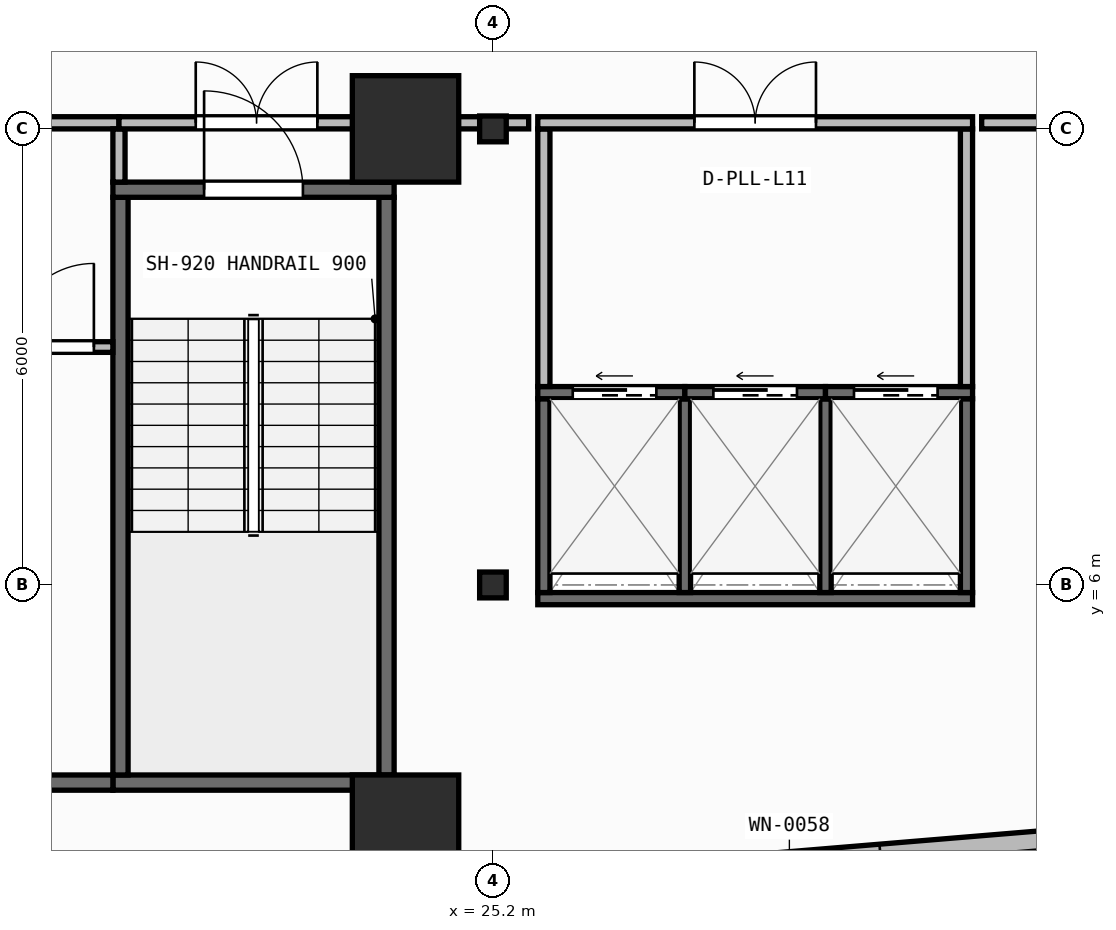
"""IFC4 building model, lengths in metres.
Left out: names, types, materials, properties, quantities, classifications, styles, units other than length and angle.
Written with IfcOpenShell. Run it as: python <this file> out.ifc"""

import sys

from ifc_helpers import new_model, si_unit, direction, frame, frame_2d, origin, origin_2d, place, context, subcontext, project, spatial, rectangle, i_section, extrude, element, fill, save


model = new_model("IFC4")
c1 = context("Model", 3, precision=1e-05, world=origin(), true_north=direction((0.0, 1.0)))
c2 = subcontext(c1, "Body", "Model", "MODEL_VIEW")
j1 = project(units=[si_unit("LENGTHUNIT", "METRE"), si_unit("PLANEANGLEUNIT", "RADIAN")], contexts=[c1])
p1 = place(None, origin())
s1 = spatial("IfcSite", under=j1, at=p1, CompositionType="ELEMENT")
p2 = place(p1, origin())
s2 = spatial("IfcBuilding", under=s1, at=p2, CompositionType="ELEMENT")
p3 = place(p2, frame((0.0, 0.0, 46.2)))
s3 = spatial("IfcBuildingStorey", under=s2, at=p3, CompositionType="ELEMENT", Elevation=46.2)
p4 = place(p3, frame((24.05, 2.8, 0.0), z_axis=(0.0, 0.0, 1.0), x_axis=(1.0, 0.0, 0.0)))
e1 = element("IfcColumn", 1, at=p4, inside=s3, PredefinedType="COLUMN", context=c2, shape_type="SweptSolid", body=[
    extrude(rectangle(XDim=1.4, YDim=1.4, at=origin_2d()), origin(), (0.0, 0.0, 1.0), 3.95),
])
p5 = place(p3, frame((25.2, 6.0, 0.0), z_axis=(0.0, 0.0, 1.0), x_axis=(1.0, 0.0, 0.0)))
e2 = element("IfcColumn", 2, at=p5, inside=s3, PredefinedType="COLUMN", context=c2, shape_type="SweptSolid", body=[
    extrude(i_section(OverallWidth=0.35, OverallDepth=0.34, WebThickness=0.016, FlangeThickness=0.028, at=origin_2d()), origin(), (0.0, 0.0, 1.0), 3.95),
])
p6 = place(p3, frame((24.05, 12.0, 0.0), z_axis=(0.0, 0.0, 1.0), x_axis=(1.0, 0.0, 0.0)))
e3 = element("IfcColumn", 3, at=p6, inside=s3, PredefinedType="COLUMN", context=c2, shape_type="SweptSolid", body=[
    extrude(rectangle(XDim=1.4, YDim=1.4, at=origin_2d()), origin(), (0.0, 0.0, 1.0), 3.95),
])
p7 = place(p3, frame((25.2, 12.0, 0.0), z_axis=(0.0, 0.0, 1.0), x_axis=(1.0, 0.0, 0.0)))
e4 = element("IfcColumn", 4, at=p7, inside=s3, PredefinedType="COLUMN", context=c2, shape_type="SweptSolid", body=[
    extrude(i_section(OverallWidth=0.35, OverallDepth=0.34, WebThickness=0.016, FlangeThickness=0.028, at=origin_2d()), origin(), (0.0, 0.0, 1.0), 3.95),
])
p8 = place(p3, frame((2.76, 0.174, 0.0), z_axis=(0.0, 0.0, 1.0), x_axis=(0.996571478456, 0.082736257641, 0.0)))
e5 = element("IfcWall", 5, at=p8, inside=s3, PredefinedType="STANDARD", context=c2, shape_type="SweptSolid", body=[
    extrude(rectangle(XDim=52.861, YDim=0.26, at=frame_2d((26.431, 0.0))), origin(), (0.0, 0.0, 1.0), 3.71),
])
p9 = place(p8, frame((25.231, 0.0, 0.9)))
e6 = element("IfcOpeningElement", 6, at=p9, cuts=e5, PredefinedType="OPENING", context=c2, shape_type="SweptSolid", body=[
    extrude(rectangle(XDim=2.4, YDim=1.65, at=frame_2d((1.2, 0.825))), frame((0.0, 0.14, 0.0), z_axis=(0.0, -1.0, 0.0), x_axis=(1.0, 0.0, 0.0)), (0.0, 0.0, 1.0), 0.28),
])
p10 = place(p3, frame((20.2, 3.4, 0.0), z_axis=(0.0, 0.0, 1.0), x_axis=(1.0, 0.0, 0.0)))
e7 = element("IfcWall", 7, at=p10, inside=s3, PredefinedType="SHEAR", context=c2, shape_type="SweptSolid", body=[
    extrude(rectangle(XDim=3.7, YDim=0.2, at=frame_2d((1.85, 0.0))), origin(), (0.0, 0.0, 1.0), 3.71),
])
for number, where, z_axis, x_axis in (
    (8, (20.3, 3.5, 0.0), (0.0, 0.0, 1.0), (0.0, 1.0, 0.0)),
    (9, (23.8, 3.5, 0.0), (0.0, 0.0, 1.0), (0.0, 1.0, 0.0)),
):
    element("IfcWall", number, at=place(p3, frame(where, z_axis=z_axis, x_axis=x_axis)), inside=s3, PredefinedType="SHEAR", context=c2, shape_type="SweptSolid", body=[
        extrude(rectangle(XDim=7.6, YDim=0.2, at=frame_2d((3.8, 0.0))), origin(), (0.0, 0.0, 1.0), 3.71),
    ])
p11 = place(p3, frame((20.2, 11.2, 0.0), z_axis=(0.0, 0.0, 1.0), x_axis=(1.0, 0.0, 0.0)))
e10 = element("IfcWall", 10, at=p11, inside=s3, PredefinedType="SHEAR", context=c2, shape_type="SweptSolid", body=[
    extrude(rectangle(XDim=3.7, YDim=0.2, at=frame_2d((1.85, 0.0))), origin(), (0.0, 0.0, 1.0), 3.71),
])
p12 = place(p11, frame((1.2, 0.0, 0.0)))
e11 = element("IfcOpeningElement", 11, at=p12, cuts=e10, PredefinedType="OPENING", context=c2, shape_type="SweptSolid", body=[
    extrude(rectangle(XDim=1.3, YDim=2.15, at=frame_2d((0.65, 1.075))), frame((0.0, 0.11, 0.0), z_axis=(0.0, -1.0, 0.0), x_axis=(1.0, 0.0, 0.0)), (0.0, 0.0, 1.0), 0.22),
])
p13 = place(p3, frame((6.5, 3.4, 0.0), z_axis=(0.0, 0.0, 1.0), x_axis=(1.0, 0.0, 0.0)))
e12 = element("IfcWall", 12, at=p13, inside=s3, PredefinedType="SHEAR", context=c2, shape_type="SweptSolid", body=[
    extrude(rectangle(XDim=13.7, YDim=0.2, at=frame_2d((6.85, 0.0))), origin(), (0.0, 0.0, 1.0), 3.71),
])
p14 = place(p3, frame((25.79, 5.82, 0.0), z_axis=(0.0, 0.0, 1.0), x_axis=(1.0, 0.0, 0.0)))
e13 = element("IfcWall", 13, at=p14, inside=s3, PredefinedType="SHEAR", context=c2, shape_type="SweptSolid", body=[
    extrude(rectangle(XDim=5.72, YDim=0.16, at=frame_2d((2.86, 0.0))), origin(), (0.0, 0.0, 1.0), 3.71),
])
for number, where, z_axis, x_axis in (
    (14, (25.87, 5.9, 0.0), (0.0, 0.0, 1.0), (0.0, 1.0, 0.0)),
    (15, (31.43, 5.9, 0.0), (0.0, 0.0, 1.0), (0.0, 1.0, 0.0)),
):
    element("IfcWall", number, at=place(p3, frame(where, z_axis=z_axis, x_axis=x_axis)), inside=s3, PredefinedType="SHEAR", context=c2, shape_type="SweptSolid", body=[
        extrude(rectangle(XDim=2.55, YDim=0.16, at=frame_2d((1.275, 0.0))), origin(), (0.0, 0.0, 1.0), 3.71),
    ])
for number, where, z_axis, x_axis in (
    (16, (27.725, 5.9, 0.0), (0.0, 0.0, 1.0), (0.0, 1.0, 0.0)),
    (17, (29.575, 5.9, 0.0), (0.0, 0.0, 1.0), (0.0, 1.0, 0.0)),
):
    element("IfcWall", number, at=place(p3, frame(where, z_axis=z_axis, x_axis=x_axis)), inside=s3, PredefinedType="SHEAR", context=c2, shape_type="SweptSolid", body=[
        extrude(rectangle(XDim=2.55, YDim=0.15, at=frame_2d((1.275, 0.0))), origin(), (0.0, 0.0, 1.0), 3.71),
    ])
p15 = place(p3, frame((25.79, 8.53, 0.0), z_axis=(0.0, 0.0, 1.0), x_axis=(1.0, 0.0, 0.0)))
e18 = element("IfcWall", 18, at=p15, inside=s3, PredefinedType="SHEAR", context=c2, shape_type="SweptSolid", body=[
    extrude(rectangle(XDim=1.935, YDim=0.16, at=frame_2d((0.968, 0.0))), origin(), (0.0, 0.0, 1.0), 3.71),
])
p16 = place(p15, frame((0.46, 0.0, 0.0)))
e19 = element("IfcOpeningElement", 19, at=p16, cuts=e18, PredefinedType="OPENING", context=c2, shape_type="SweptSolid", body=[
    extrude(rectangle(XDim=1.1, YDim=2.15, at=frame_2d((0.55, 1.075))), frame((0.0, 0.09, 0.0), z_axis=(0.0, -1.0, 0.0), x_axis=(1.0, 0.0, 0.0)), (0.0, 0.0, 1.0), 0.18),
])
p17 = place(p3, frame((27.725, 8.53, 0.0), z_axis=(0.0, 0.0, 1.0), x_axis=(1.0, 0.0, 0.0)))
e20 = element("IfcWall", 20, at=p17, inside=s3, PredefinedType="SHEAR", context=c2, shape_type="SweptSolid", body=[
    extrude(rectangle(XDim=1.85, YDim=0.16, at=frame_2d((0.925, 0.0))), origin(), (0.0, 0.0, 1.0), 3.71),
])
p18 = place(p17, frame((0.375, 0.0, 0.0)))
e21 = element("IfcOpeningElement", 21, at=p18, cuts=e20, PredefinedType="OPENING", context=c2, shape_type="SweptSolid", body=[
    extrude(rectangle(XDim=1.1, YDim=2.15, at=frame_2d((0.55, 1.075))), frame((0.0, 0.09, 0.0), z_axis=(0.0, -1.0, 0.0), x_axis=(1.0, 0.0, 0.0)), (0.0, 0.0, 1.0), 0.18),
])
p19 = place(p3, frame((29.575, 8.53, 0.0), z_axis=(0.0, 0.0, 1.0), x_axis=(1.0, 0.0, 0.0)))
e22 = element("IfcWall", 22, at=p19, inside=s3, PredefinedType="SHEAR", context=c2, shape_type="SweptSolid", body=[
    extrude(rectangle(XDim=1.935, YDim=0.16, at=frame_2d((0.968, 0.0))), origin(), (0.0, 0.0, 1.0), 3.71),
])
p20 = place(p19, frame((0.375, 0.0, 0.0)))
e23 = element("IfcOpeningElement", 23, at=p20, cuts=e22, PredefinedType="OPENING", context=c2, shape_type="SweptSolid", body=[
    extrude(rectangle(XDim=1.1, YDim=2.15, at=frame_2d((0.55, 1.075))), frame((0.0, 0.09, 0.0), z_axis=(0.0, -1.0, 0.0), x_axis=(1.0, 0.0, 0.0)), (0.0, 0.0, 1.0), 0.18),
])
p21 = place(p3, frame((18.61, 9.13, 0.0), z_axis=(0.0, 0.0, 1.0), x_axis=(1.0, 0.0, 0.0)))
e24 = element("IfcWall", 24, at=p21, inside=s3, PredefinedType="PARTITIONING", context=c2, shape_type="SweptSolid", body=[
    extrude(rectangle(XDim=1.59, YDim=0.14, at=frame_2d((0.795, 0.0))), origin(), (0.0, 0.0, 1.0), 3.71),
])
p22 = place(p21, frame((0.24, 0.0, 0.0)))
e25 = element("IfcOpeningElement", 25, at=p22, cuts=e24, PredefinedType="OPENING", context=c2, shape_type="SweptSolid", body=[
    extrude(rectangle(XDim=1.1, YDim=2.1, at=frame_2d((0.55, 1.05))), frame((0.0, 0.08, 0.0), z_axis=(0.0, -1.0, 0.0), x_axis=(1.0, 0.0, 0.0)), (0.0, 0.0, 1.0), 0.16),
])
p23 = place(p3, frame((12.58, 12.08, 0.0), z_axis=(0.0, 0.0, 1.0), x_axis=(1.0, 0.0, 0.0)))
e26 = element("IfcWall", 26, at=p23, inside=s3, PredefinedType="PARTITIONING", context=c2, shape_type="SweptSolid", body=[
    extrude(rectangle(XDim=7.7, YDim=0.16, at=frame_2d((3.85, 0.0))), origin(), (0.0, 0.0, 1.0), 3.073),
])
p24 = place(p23, frame((3.05, 0.0, 0.0)))
e27 = element("IfcOpeningElement", 27, at=p24, cuts=e26, PredefinedType="OPENING", context=c2, shape_type="SweptSolid", body=[
    extrude(rectangle(XDim=1.6, YDim=2.05, at=frame_2d((0.8, 1.025))), frame((0.0, 0.09, 0.0), z_axis=(0.0, -1.0, 0.0), x_axis=(1.0, 0.0, 0.0)), (0.0, 0.0, 1.0), 0.18),
])
p25 = place(p3, frame((20.28, 11.3, 0.0), z_axis=(0.0, 0.0, 1.0), x_axis=(0.0, 1.0, 0.0)))
e28 = element("IfcWall", 28, at=p25, inside=s3, PredefinedType="PARTITIONING", context=c2, shape_type="SweptSolid", body=[
    extrude(rectangle(XDim=0.7, YDim=0.16, at=frame_2d((0.35, 0.0))), origin(), (0.0, 0.0, 1.0), 3.71),
])
p26 = place(p3, frame((20.28, 12.08, 0.0), z_axis=(0.0, 0.0, 1.0), x_axis=(1.0, 0.0, 0.0)))
e29 = element("IfcWall", 29, at=p26, inside=s3, PredefinedType="PARTITIONING", context=c2, shape_type="SweptSolid", body=[
    extrude(rectangle(XDim=3.62, YDim=0.16, at=frame_2d((1.81, 0.0))), origin(), (0.0, 0.0, 1.0), 3.073),
])
p27 = place(p26, frame((1.01, 0.0, 0.0)))
e30 = element("IfcOpeningElement", 30, at=p27, cuts=e29, PredefinedType="OPENING", context=c2, shape_type="SweptSolid", body=[
    extrude(rectangle(XDim=1.6, YDim=2.05, at=frame_2d((0.8, 1.025))), frame((0.0, 0.09, 0.0), z_axis=(0.0, -1.0, 0.0), x_axis=(1.0, 0.0, 0.0)), (0.0, 0.0, 1.0), 0.18),
])
p28 = place(p3, frame((23.82, 11.3, 0.0), z_axis=(0.0, 0.0, 1.0), x_axis=(0.0, 1.0, 0.0)))
e31 = element("IfcWall", 31, at=p28, inside=s3, PredefinedType="PARTITIONING", context=c2, shape_type="SweptSolid", body=[
    extrude(rectangle(XDim=0.7, YDim=0.16, at=frame_2d((0.35, 0.0))), origin(), (0.0, 0.0, 1.0), 3.71),
])
for number, where, z_axis, x_axis in (
    (32, (25.87, 8.61, 0.0), (0.0, 0.0, 1.0), (0.0, 1.0, 0.0)),
    (33, (31.43, 8.61, 0.0), (0.0, 0.0, 1.0), (0.0, 1.0, 0.0)),
):
    element("IfcWall", number, at=place(p3, frame(where, z_axis=z_axis, x_axis=x_axis)), inside=s3, PredefinedType="PARTITIONING", context=c2, shape_type="SweptSolid", body=[
        extrude(rectangle(XDim=3.39, YDim=0.16, at=frame_2d((1.695, 0.0))), origin(), (0.0, 0.0, 1.0), 3.71),
    ])
p29 = place(p3, frame((25.79, 12.08, 0.0), z_axis=(0.0, 0.0, 1.0), x_axis=(1.0, 0.0, 0.0)))
e34 = element("IfcWall", 34, at=p29, inside=s3, PredefinedType="PARTITIONING", context=c2, shape_type="SweptSolid", body=[
    extrude(rectangle(XDim=5.72, YDim=0.16, at=frame_2d((2.86, 0.0))), origin(), (0.0, 0.0, 1.0), 3.073),
])
p30 = place(p29, frame((2.06, 0.0, 0.0)))
e35 = element("IfcOpeningElement", 35, at=p30, cuts=e34, PredefinedType="OPENING", context=c2, shape_type="SweptSolid", body=[
    extrude(rectangle(XDim=1.6, YDim=2.05, at=frame_2d((0.8, 1.025))), frame((0.0, 0.09, 0.0), z_axis=(0.0, -1.0, 0.0), x_axis=(1.0, 0.0, 0.0)), (0.0, 0.0, 1.0), 0.18),
])
p31 = place(p3, frame((24.02, 12.08, 0.0), z_axis=(0.0, 0.0, 1.0), x_axis=(1.0, 0.0, 0.0)))
e36 = element("IfcWall", 36, at=p31, inside=s3, PredefinedType="PARTITIONING", context=c2, shape_type="SweptSolid", body=[
    extrude(rectangle(XDim=1.65, YDim=0.16, at=frame_2d((0.825, 0.0))), origin(), (0.0, 0.0, 1.0), 3.073),
])
p32 = place(p3, frame((31.63, 12.08, 0.0), z_axis=(0.0, 0.0, 1.0), x_axis=(1.0, 0.0, 0.0)))
e37 = element("IfcWall", 37, at=p32, inside=s3, PredefinedType="PARTITIONING", context=c2, shape_type="SweptSolid", body=[
    extrude(rectangle(XDim=11.181, YDim=0.16, at=frame_2d((5.59, 0.0))), origin(), (0.0, 0.0, 1.0), 3.073),
])
p33 = place(p12, origin())
e38 = element("IfcDoor", 38, at=p33, inside=s3, OperationType="SINGLE_SWING_LEFT", PredefinedType="DOOR", context=c2, shape_type="SweptSolid", body=[
    extrude(rectangle(XDim=1.3, YDim=2.15, at=frame_2d((0.65, 1.075))), frame((0.0, 0.025, 0.0), z_axis=(0.0, -1.0, 0.0), x_axis=(1.0, 0.0, 0.0)), (0.0, 0.0, 1.0), 0.05),
])
fill(e11, e38)
p34 = place(p16, origin())
e39 = element("IfcDoor", 39, at=p34, inside=s3, OperationType="SLIDING_TO_LEFT", PredefinedType="DOOR", context=c2, shape_type="SweptSolid", body=[
    extrude(rectangle(XDim=1.1, YDim=2.15, at=frame_2d((0.55, 1.075))), frame((0.0, 0.025, 0.0), z_axis=(0.0, -1.0, 0.0), x_axis=(1.0, 0.0, 0.0)), (0.0, 0.0, 1.0), 0.05),
])
fill(e19, e39)
p35 = place(p18, origin())
e40 = element("IfcDoor", 40, at=p35, inside=s3, OperationType="SLIDING_TO_LEFT", PredefinedType="DOOR", context=c2, shape_type="SweptSolid", body=[
    extrude(rectangle(XDim=1.1, YDim=2.15, at=frame_2d((0.55, 1.075))), frame((0.0, 0.025, 0.0), z_axis=(0.0, -1.0, 0.0), x_axis=(1.0, 0.0, 0.0)), (0.0, 0.0, 1.0), 0.05),
])
fill(e21, e40)
p36 = place(p20, origin())
e41 = element("IfcDoor", 41, at=p36, inside=s3, OperationType="SLIDING_TO_LEFT", PredefinedType="DOOR", context=c2, shape_type="SweptSolid", body=[
    extrude(rectangle(XDim=1.1, YDim=2.15, at=frame_2d((0.55, 1.075))), frame((0.0, 0.025, 0.0), z_axis=(0.0, -1.0, 0.0), x_axis=(1.0, 0.0, 0.0)), (0.0, 0.0, 1.0), 0.05),
])
fill(e23, e41)
p37 = place(p22, origin())
e42 = element("IfcDoor", 42, at=p37, inside=s3, OperationType="SINGLE_SWING_RIGHT", PredefinedType="DOOR", context=c2, shape_type="SweptSolid", body=[
    extrude(rectangle(XDim=1.1, YDim=2.1, at=frame_2d((0.55, 1.05))), frame((0.0, 0.025, 0.0), z_axis=(0.0, -1.0, 0.0), x_axis=(1.0, 0.0, 0.0)), (0.0, 0.0, 1.0), 0.05),
])
fill(e25, e42)
p38 = place(p27, origin())
e43 = element("IfcDoor", 43, at=p38, inside=s3, OperationType="DOUBLE_DOOR_SINGLE_SWING", PredefinedType="DOOR", context=c2, shape_type="SweptSolid", body=[
    extrude(rectangle(XDim=1.6, YDim=2.05, at=frame_2d((0.8, 1.025))), frame((0.0, 0.025, 0.0), z_axis=(0.0, -1.0, 0.0), x_axis=(1.0, 0.0, 0.0)), (0.0, 0.0, 1.0), 0.05),
])
fill(e30, e43)
p39 = place(p30, origin())
e44 = element("IfcDoor", 44, at=p39, inside=s3, OperationType="DOUBLE_DOOR_SINGLE_SWING", PredefinedType="DOOR", context=c2, shape_type="SweptSolid", body=[
    extrude(rectangle(XDim=1.6, YDim=2.05, at=frame_2d((0.8, 1.025))), frame((0.0, 0.025, 0.0), z_axis=(0.0, -1.0, 0.0), x_axis=(1.0, 0.0, 0.0)), (0.0, 0.0, 1.0), 0.05),
])
fill(e35, e44)
save(model, sys.argv[1])
